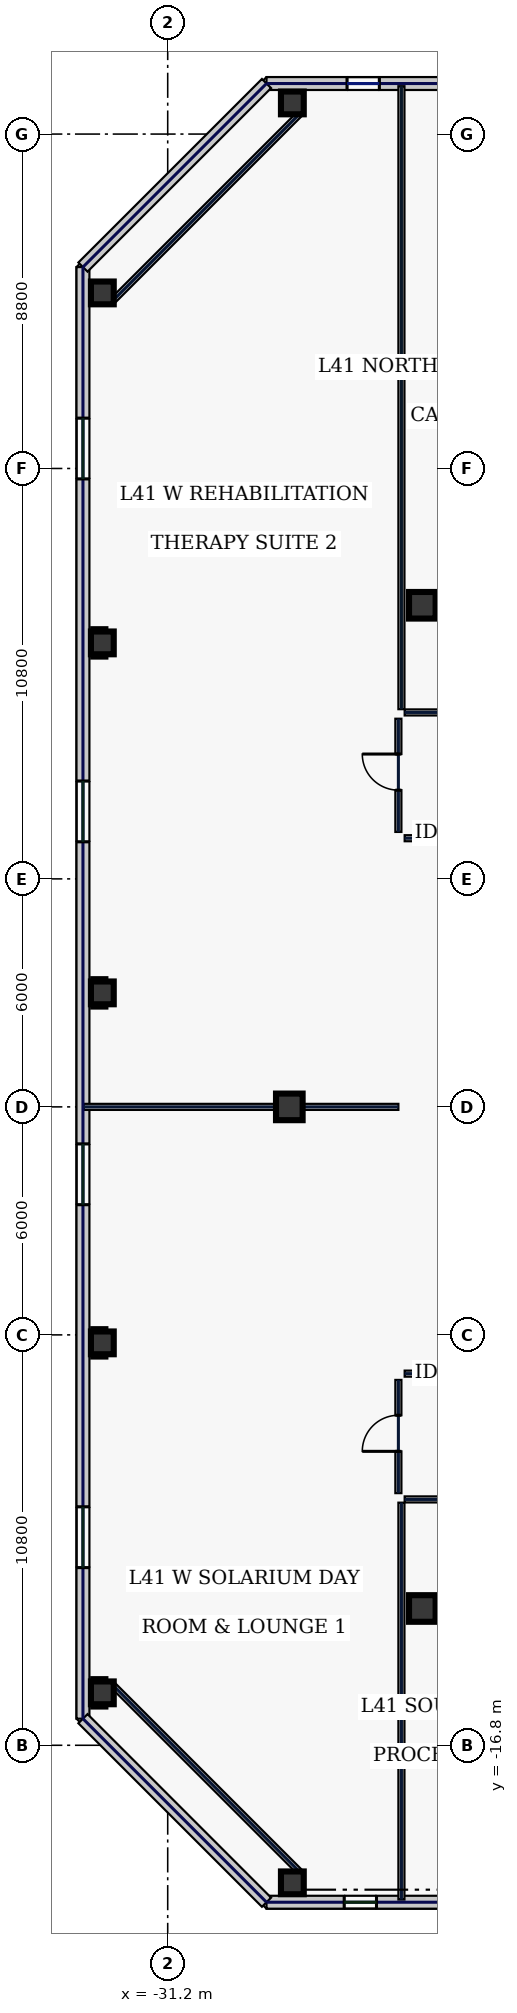
"""IFC4 building model, lengths in metres.
Left out: names, types, materials, properties, quantities, classifications, styles, units other than length and angle.
Written with IfcOpenShell. Run it as: python <this file> out.ifc"""

import sys

from ifc_helpers import new_model, si_unit, direction, frame, frame_2d, origin, origin_2d, place, context, subcontext, project, spatial, rectangle, hollow_rectangle, extrude, element, fill, save


model = new_model("IFC4")
c1 = context("Model", 3, precision=1e-05, world=origin(), true_north=direction((0.0, 1.0)))
c2 = subcontext(c1, "Body", "Model", "MODEL_VIEW")
j1 = project(units=[si_unit("LENGTHUNIT", "METRE"), si_unit("PLANEANGLEUNIT", "RADIAN")], contexts=[c1])
p1 = place(None, origin())
s1 = spatial("IfcSite", under=j1, at=p1, CompositionType="ELEMENT")
p2 = place(p1, origin())
s2 = spatial("IfcBuilding", under=s1, at=p2, CompositionType="ELEMENT")
p3 = place(p2, frame((0.0, 0.0, 180.2)))
s3 = spatial("IfcBuildingStorey", under=s2, at=p3, CompositionType="ELEMENT", Elevation=180.2)
for number, where, z_axis, x_axis in (
    (1, (-24.5, -13.2, 0.0), (0.0, 0.0, 1.0), (1.0, 0.0, 0.0)),
    (2, (-24.5, 13.2, 0.0), (0.0, 0.0, 1.0), (1.0, 0.0, 0.0)),
    (3, (-28.0, 0.0, 0.0), (0.0, 0.0, 1.0), (1.0, 0.0, 0.0)),
):
    element("IfcColumn", number, at=place(p3, frame(where, z_axis=z_axis, x_axis=x_axis)), inside=s3, PredefinedType="COLUMN", context=c2, shape_type="SweptSolid", body=[
        extrude(hollow_rectangle(XDim=0.7, YDim=0.7, WallThickness=0.032, at=origin_2d()), origin(), (0.0, 0.0, 1.0), 3.74),
    ])
for number, where, z_axis, x_axis in (
    (4, (-27.92, -20.42, 0.0), (0.0, 0.0, 1.0), (1.0, 0.0, 0.0)),
    (5, (-27.92, 26.42, 0.0), (0.0, 0.0, 1.0), (1.0, 0.0, 0.0)),
    (6, (-32.92, 21.42, 0.0), (0.0, 0.0, 1.0), (1.0, 0.0, 0.0)),
    (7, (-32.92, 12.21, 0.0), (0.0, 0.0, 1.0), (1.0, 0.0, 0.0)),
    (8, (-32.92, 3.0, 0.0), (0.0, 0.0, 1.0), (1.0, 0.0, 0.0)),
    (9, (-32.92, -6.21, 0.0), (0.0, 0.0, 1.0), (1.0, 0.0, 0.0)),
    (10, (-32.92, -15.42, 0.0), (0.0, 0.0, 1.0), (1.0, 0.0, 0.0)),
):
    element("IfcColumn", number, at=place(p3, frame(where, z_axis=z_axis, x_axis=x_axis)), inside=s3, PredefinedType="COLUMN", context=c2, shape_type="SweptSolid", body=[
        extrude(hollow_rectangle(XDim=0.6, YDim=0.6, WallThickness=0.028, at=origin_2d()), origin(), (0.0, 0.0, 1.0), 3.74),
    ])
p4 = place(p3, frame((-28.6, -20.93, 0.0), z_axis=(0.0, 0.0, 1.0), x_axis=(1.0, 0.0, 0.0)))
e11 = element("IfcWall", 11, at=p4, inside=s3, PredefinedType="STANDARD", context=c2, shape_type="SweptSolid", body=[
    extrude(rectangle(XDim=19.937, YDim=0.34, at=frame_2d((9.969, 0.0))), origin(), (0.0, 0.0, 1.0), 3.74),
])
p5 = place(p4, frame((2.044, 0.0, 0.8)))
e12 = element("IfcOpeningElement", 12, at=p5, cuts=e11, PredefinedType="OPENING", context=c2, shape_type="SweptSolid", body=[
    extrude(rectangle(XDim=0.85, YDim=1.85, at=frame_2d((0.425, 0.925))), frame((0.0, 0.18, 0.0), z_axis=(0.0, -1.0, 0.0), x_axis=(1.0, 0.0, 0.0)), (0.0, 0.0, 1.0), 0.36),
])
p6 = place(p4, frame((6.029, 0.0, 0.8)))
e13 = element("IfcOpeningElement", 13, at=p6, cuts=e11, PredefinedType="OPENING", context=c2, shape_type="SweptSolid", body=[
    extrude(rectangle(XDim=0.85, YDim=1.85, at=frame_2d((0.425, 0.925))), frame((0.0, 0.18, 0.0), z_axis=(0.0, -1.0, 0.0), x_axis=(1.0, 0.0, 0.0)), (0.0, 0.0, 1.0), 0.36),
])
p7 = place(p4, frame((10.707, 0.0, 0.8)))
e14 = element("IfcOpeningElement", 14, at=p7, cuts=e11, PredefinedType="OPENING", context=c2, shape_type="SweptSolid", body=[
    extrude(rectangle(XDim=1.95, YDim=2.1, at=frame_2d((0.975, 1.05))), frame((0.0, 0.18, 0.0), z_axis=(0.0, -1.0, 0.0), x_axis=(1.0, 0.0, 0.0)), (0.0, 0.0, 1.0), 0.36),
])
p8 = place(p4, frame((14.692, 0.0, 0.8)))
e15 = element("IfcOpeningElement", 15, at=p8, cuts=e11, PredefinedType="OPENING", context=c2, shape_type="SweptSolid", body=[
    extrude(rectangle(XDim=1.95, YDim=2.1, at=frame_2d((0.975, 1.05))), frame((0.0, 0.18, 0.0), z_axis=(0.0, -1.0, 0.0), x_axis=(1.0, 0.0, 0.0)), (0.0, 0.0, 1.0), 0.36),
])
p9 = place(p3, frame((-8.663, 26.93, 0.0), z_axis=(0.0, 0.0, 1.0), x_axis=(-1.0, 0.0, 0.0)))
e16 = element("IfcWall", 16, at=p9, inside=s3, PredefinedType="STANDARD", context=c2, shape_type="SweptSolid", body=[
    extrude(rectangle(XDim=19.937, YDim=0.34, at=frame_2d((9.969, 0.0))), origin(), (0.0, 0.0, 1.0), 3.74),
])
p10 = place(p9, frame((16.968, 0.0, 0.7)))
e17 = element("IfcOpeningElement", 17, at=p10, cuts=e16, PredefinedType="OPENING", context=c2, shape_type="SweptSolid", body=[
    extrude(rectangle(XDim=0.85, YDim=1.85, at=frame_2d((0.425, 0.925))), frame((0.0, 0.18, 0.0), z_axis=(0.0, -1.0, 0.0), x_axis=(1.0, 0.0, 0.0)), (0.0, 0.0, 1.0), 0.36),
])
p11 = place(p9, frame((12.983, 0.0, 0.7)))
e18 = element("IfcOpeningElement", 18, at=p11, cuts=e16, PredefinedType="OPENING", context=c2, shape_type="SweptSolid", body=[
    extrude(rectangle(XDim=0.85, YDim=1.85, at=frame_2d((0.425, 0.925))), frame((0.0, 0.18, 0.0), z_axis=(0.0, -1.0, 0.0), x_axis=(1.0, 0.0, 0.0)), (0.0, 0.0, 1.0), 0.36),
])
p12 = place(p9, frame((7.355, 0.0, 0.7)))
e19 = element("IfcOpeningElement", 19, at=p12, cuts=e16, PredefinedType="OPENING", context=c2, shape_type="SweptSolid", body=[
    extrude(rectangle(XDim=1.8, YDim=2.2, at=frame_2d((0.9, 1.1))), frame((0.0, 0.18, 0.0), z_axis=(0.0, -1.0, 0.0), x_axis=(1.0, 0.0, 0.0)), (0.0, 0.0, 1.0), 0.36),
])
p13 = place(p9, frame((3.371, 0.0, 0.7)))
e20 = element("IfcOpeningElement", 20, at=p13, cuts=e16, PredefinedType="OPENING", context=c2, shape_type="SweptSolid", body=[
    extrude(rectangle(XDim=0.85, YDim=1.85, at=frame_2d((0.425, 0.925))), frame((0.0, 0.18, 0.0), z_axis=(0.0, -1.0, 0.0), x_axis=(1.0, 0.0, 0.0)), (0.0, 0.0, 1.0), 0.36),
])
p14 = place(p3, frame((-33.43, 22.1, 0.0), z_axis=(0.0, 0.0, 1.0), x_axis=(0.0, -1.0, 0.0)))
e21 = element("IfcWall", 21, at=p14, inside=s3, PredefinedType="STANDARD", context=c2, shape_type="SweptSolid", body=[
    extrude(rectangle(XDim=38.2, YDim=0.34, at=frame_2d((19.1, 0.0))), origin(), (0.0, 0.0, 1.0), 3.74),
])
p15 = place(p14, frame((3.975, 0.0, 0.58)))
e22 = element("IfcOpeningElement", 22, at=p15, cuts=e21, PredefinedType="OPENING", context=c2, shape_type="SweptSolid", body=[
    extrude(rectangle(XDim=1.6, YDim=2.3, at=frame_2d((0.8, 1.15))), frame((0.0, 0.18, 0.0), z_axis=(0.0, -1.0, 0.0), x_axis=(1.0, 0.0, 0.0)), (0.0, 0.0, 1.0), 0.36),
])
p16 = place(p14, frame((13.525, 0.0, 0.58)))
e23 = element("IfcOpeningElement", 23, at=p16, cuts=e21, PredefinedType="OPENING", context=c2, shape_type="SweptSolid", body=[
    extrude(rectangle(XDim=1.6, YDim=2.3, at=frame_2d((0.8, 1.15))), frame((0.0, 0.18, 0.0), z_axis=(0.0, -1.0, 0.0), x_axis=(1.0, 0.0, 0.0)), (0.0, 0.0, 1.0), 0.36),
])
p17 = place(p14, frame((23.075, 0.0, 0.58)))
e24 = element("IfcOpeningElement", 24, at=p17, cuts=e21, PredefinedType="OPENING", context=c2, shape_type="SweptSolid", body=[
    extrude(rectangle(XDim=1.6, YDim=2.3, at=frame_2d((0.8, 1.15))), frame((0.0, 0.18, 0.0), z_axis=(0.0, -1.0, 0.0), x_axis=(1.0, 0.0, 0.0)), (0.0, 0.0, 1.0), 0.36),
])
p18 = place(p14, frame((32.625, 0.0, 0.58)))
e25 = element("IfcOpeningElement", 25, at=p18, cuts=e21, PredefinedType="OPENING", context=c2, shape_type="SweptSolid", body=[
    extrude(rectangle(XDim=1.6, YDim=2.3, at=frame_2d((0.8, 1.15))), frame((0.0, 0.18, 0.0), z_axis=(0.0, -1.0, 0.0), x_axis=(1.0, 0.0, 0.0)), (0.0, 0.0, 1.0), 0.36),
])
for number, where, z_axis, x_axis in (
    (26, (-28.6, 26.93, 0.0), (0.0, 0.0, 1.0), (-0.707, -0.707, 0.0)),
    (27, (-33.43, -16.1, 0.0), (0.0, 0.0, 1.0), (0.707, -0.707, 0.0)),
):
    element("IfcWall", number, at=place(p3, frame(where, z_axis=z_axis, x_axis=x_axis)), inside=s3, PredefinedType="STANDARD", context=c2, shape_type="SweptSolid", body=[
        extrude(rectangle(XDim=6.83, YDim=0.34, at=frame_2d((3.415, 0.0))), origin(), (0.0, 0.0, 1.0), 3.74),
    ])
for number, where, z_axis, x_axis in (
    (28, (-27.68, 26.18, 0.0), (0.0, 0.0, 1.0), (-0.707, -0.707, 0.0)),
    (29, (-32.68, -15.18, 0.0), (0.0, 0.0, 1.0), (0.707, -0.707, 0.0)),
):
    element("IfcWall", number, at=place(p3, frame(where, z_axis=z_axis, x_axis=x_axis)), inside=s3, PredefinedType="PARTITIONING", context=c2, shape_type="SweptSolid", body=[
        extrude(rectangle(XDim=7.071, YDim=0.16, at=frame_2d((3.536, 0.0))), origin(), (0.0, 0.0, 1.0), 3.74),
    ])
p19 = place(p3, frame((-25.13, -10.165, 0.0), z_axis=(0.0, 0.0, 1.0), x_axis=(0.0, 1.0, 0.0)))
e30 = element("IfcWall", 30, at=p19, inside=s3, PredefinedType="PARTITIONING", context=c2, shape_type="SweptSolid", body=[
    extrude(rectangle(XDim=2.98, YDim=0.16, at=frame_2d((1.49, 0.0))), origin(), (0.0, 0.0, 1.0), 3.74),
])
p20 = place(p19, frame((1.1, 0.0, 0.0)))
e31 = element("IfcOpeningElement", 31, at=p20, cuts=e30, PredefinedType="OPENING", context=c2, shape_type="SweptSolid", body=[
    extrude(rectangle(XDim=0.95, YDim=2.2, at=frame_2d((0.475, 1.1))), frame((0.0, 0.09, 0.0), z_axis=(0.0, -1.0, 0.0), x_axis=(1.0, 0.0, 0.0)), (0.0, 0.0, 1.0), 0.18),
])
for number, where, z_axis, x_axis in (
    (32, (-24.965, -7.02, 0.0), (0.0, 0.0, 1.0), (1.0, 0.0, 0.0)),
    (33, (-10.715, 7.07, 0.0), (0.0, 0.0, 1.0), (-1.0, 0.0, 0.0)),
):
    element("IfcWall", number, at=place(p3, frame(where, z_axis=z_axis, x_axis=x_axis)), inside=s3, PredefinedType="PARTITIONING", context=c2, shape_type="SweptSolid", body=[
        extrude(rectangle(XDim=14.25, YDim=0.16, at=frame_2d((7.125, 0.0))), origin(), (0.0, 0.0, 1.0), 3.74),
    ])
p21 = place(p3, frame((-25.13, 7.235, 0.0), z_axis=(0.0, 0.0, 1.0), x_axis=(0.0, 1.0, 0.0)))
e34 = element("IfcWall", 34, at=p21, inside=s3, PredefinedType="PARTITIONING", context=c2, shape_type="SweptSolid", body=[
    extrude(rectangle(XDim=2.98, YDim=0.16, at=frame_2d((1.49, 0.0))), origin(), (0.0, 0.0, 1.0), 3.74),
])
p22 = place(p21, frame((1.1, 0.0, 0.0)))
e35 = element("IfcOpeningElement", 35, at=p22, cuts=e34, PredefinedType="OPENING", context=c2, shape_type="SweptSolid", body=[
    extrude(rectangle(XDim=0.95, YDim=2.2, at=frame_2d((0.475, 1.1))), frame((0.0, 0.09, 0.0), z_axis=(0.0, -1.0, 0.0), x_axis=(1.0, 0.0, 0.0)), (0.0, 0.0, 1.0), 0.18),
])
p23 = place(p3, frame((-24.965, 10.38, 0.0), z_axis=(0.0, 0.0, 1.0), x_axis=(1.0, 0.0, 0.0)))
e36 = element("IfcWall", 36, at=p23, inside=s3, PredefinedType="PARTITIONING", context=c2, shape_type="SweptSolid", body=[
    extrude(rectangle(XDim=49.93, YDim=0.16, at=frame_2d((24.965, 0.0))), origin(), (0.0, 0.0, 1.0), 3.74),
])
p24 = place(p23, frame((2.044, 0.0, 0.0)))
e37 = element("IfcOpeningElement", 37, at=p24, cuts=e36, PredefinedType="OPENING", context=c2, shape_type="SweptSolid", body=[
    extrude(rectangle(XDim=1.15, YDim=2.2, at=frame_2d((0.575, 1.1))), frame((0.0, 0.09, 0.0), z_axis=(0.0, -1.0, 0.0), x_axis=(1.0, 0.0, 0.0)), (0.0, 0.0, 1.0), 0.18),
])
p25 = place(p23, frame((7.325, 0.0, 0.0)))
e38 = element("IfcOpeningElement", 38, at=p25, cuts=e36, PredefinedType="OPENING", context=c2, shape_type="SweptSolid", body=[
    extrude(rectangle(XDim=1.3, YDim=2.2, at=frame_2d((0.65, 1.1))), frame((0.0, 0.09, 0.0), z_axis=(0.0, -1.0, 0.0), x_axis=(1.0, 0.0, 0.0)), (0.0, 0.0, 1.0), 0.18),
])
p26 = place(p23, frame((13.525, 0.0, 0.0)))
e39 = element("IfcOpeningElement", 39, at=p26, cuts=e36, PredefinedType="OPENING", context=c2, shape_type="SweptSolid", body=[
    extrude(rectangle(XDim=1.3, YDim=2.2, at=frame_2d((0.65, 1.1))), frame((0.0, 0.09, 0.0), z_axis=(0.0, -1.0, 0.0), x_axis=(1.0, 0.0, 0.0)), (0.0, 0.0, 1.0), 0.18),
])
p27 = place(p23, frame((20.65, 0.0, 0.0)))
e40 = element("IfcOpeningElement", 40, at=p27, cuts=e36, PredefinedType="OPENING", context=c2, shape_type="SweptSolid", body=[
    extrude(rectangle(XDim=0.95, YDim=2.2, at=frame_2d((0.475, 1.1))), frame((0.0, 0.09, 0.0), z_axis=(0.0, -1.0, 0.0), x_axis=(1.0, 0.0, 0.0)), (0.0, 0.0, 1.0), 0.18),
])
p28 = place(p23, frame((28.175, 0.0, 0.0)))
e41 = element("IfcOpeningElement", 41, at=p28, cuts=e36, PredefinedType="OPENING", context=c2, shape_type="SweptSolid", body=[
    extrude(rectangle(XDim=1.45, YDim=2.2, at=frame_2d((0.725, 1.1))), frame((0.0, 0.09, 0.0), z_axis=(0.0, -1.0, 0.0), x_axis=(1.0, 0.0, 0.0)), (0.0, 0.0, 1.0), 0.18),
])
p29 = place(p23, frame((37.43, 0.0, 0.0)))
e42 = element("IfcOpeningElement", 42, at=p29, cuts=e36, PredefinedType="OPENING", context=c2, shape_type="SweptSolid", body=[
    extrude(rectangle(XDim=0.95, YDim=2.2, at=frame_2d((0.475, 1.1))), frame((0.0, 0.09, 0.0), z_axis=(0.0, -1.0, 0.0), x_axis=(1.0, 0.0, 0.0)), (0.0, 0.0, 1.0), 0.18),
])
p30 = place(p23, frame((42.37, 0.0, 0.0)))
e43 = element("IfcOpeningElement", 43, at=p30, cuts=e36, PredefinedType="OPENING", context=c2, shape_type="SweptSolid", body=[
    extrude(rectangle(XDim=0.95, YDim=2.2, at=frame_2d((0.475, 1.1))), frame((0.0, 0.09, 0.0), z_axis=(0.0, -1.0, 0.0), x_axis=(1.0, 0.0, 0.0)), (0.0, 0.0, 1.0), 0.18),
])
p31 = place(p23, frame((47.106, 0.0, 0.0)))
e44 = element("IfcOpeningElement", 44, at=p31, cuts=e36, PredefinedType="OPENING", context=c2, shape_type="SweptSolid", body=[
    extrude(rectangle(XDim=1.15, YDim=2.2, at=frame_2d((0.575, 1.1))), frame((0.0, 0.09, 0.0), z_axis=(0.0, -1.0, 0.0), x_axis=(1.0, 0.0, 0.0)), (0.0, 0.0, 1.0), 0.18),
])
p32 = place(p3, frame((24.965, -10.33, 0.0), z_axis=(0.0, 0.0, 1.0), x_axis=(-1.0, 0.0, 0.0)))
e45 = element("IfcWall", 45, at=p32, inside=s3, PredefinedType="PARTITIONING", context=c2, shape_type="SweptSolid", body=[
    extrude(rectangle(XDim=49.93, YDim=0.16, at=frame_2d((24.965, 0.0))), origin(), (0.0, 0.0, 1.0), 3.74),
])
p33 = place(p32, frame((47.106, 0.0, 0.0)))
e46 = element("IfcOpeningElement", 46, at=p33, cuts=e45, PredefinedType="OPENING", context=c2, shape_type="SweptSolid", body=[
    extrude(rectangle(XDim=0.95, YDim=2.2, at=frame_2d((0.475, 1.1))), frame((0.0, 0.09, 0.0), z_axis=(0.0, -1.0, 0.0), x_axis=(1.0, 0.0, 0.0)), (0.0, 0.0, 1.0), 0.18),
])
p34 = place(p32, frame((40.075, 0.0, 0.0)))
e47 = element("IfcOpeningElement", 47, at=p34, cuts=e45, PredefinedType="OPENING", context=c2, shape_type="SweptSolid", body=[
    extrude(rectangle(XDim=1.05, YDim=2.2, at=frame_2d((0.525, 1.1))), frame((0.0, 0.09, 0.0), z_axis=(0.0, -1.0, 0.0), x_axis=(1.0, 0.0, 0.0)), (0.0, 0.0, 1.0), 0.18),
])
p35 = place(p32, frame((30.3, 0.0, 0.0)))
e48 = element("IfcOpeningElement", 48, at=p35, cuts=e45, PredefinedType="OPENING", context=c2, shape_type="SweptSolid", body=[
    extrude(rectangle(XDim=0.95, YDim=2.2, at=frame_2d((0.475, 1.1))), frame((0.0, 0.09, 0.0), z_axis=(0.0, -1.0, 0.0), x_axis=(1.0, 0.0, 0.0)), (0.0, 0.0, 1.0), 0.18),
])
p36 = place(p32, frame((20.375, 0.0, 0.0)))
e49 = element("IfcOpeningElement", 49, at=p36, cuts=e45, PredefinedType="OPENING", context=c2, shape_type="SweptSolid", body=[
    extrude(rectangle(XDim=1.3, YDim=2.2, at=frame_2d((0.65, 1.1))), frame((0.0, 0.09, 0.0), z_axis=(0.0, -1.0, 0.0), x_axis=(1.0, 0.0, 0.0)), (0.0, 0.0, 1.0), 0.18),
])
p37 = place(p32, frame((11.025, 0.0, 0.0)))
e50 = element("IfcOpeningElement", 50, at=p37, cuts=e45, PredefinedType="OPENING", context=c2, shape_type="SweptSolid", body=[
    extrude(rectangle(XDim=0.95, YDim=2.2, at=frame_2d((0.475, 1.1))), frame((0.0, 0.09, 0.0), z_axis=(0.0, -1.0, 0.0), x_axis=(1.0, 0.0, 0.0)), (0.0, 0.0, 1.0), 0.18),
])
p38 = place(p32, frame((3.144, 0.0, 0.0)))
e51 = element("IfcOpeningElement", 51, at=p38, cuts=e45, PredefinedType="OPENING", context=c2, shape_type="SweptSolid", body=[
    extrude(rectangle(XDim=0.95, YDim=2.2, at=frame_2d((0.475, 1.1))), frame((0.0, 0.09, 0.0), z_axis=(0.0, -1.0, 0.0), x_axis=(1.0, 0.0, 0.0)), (0.0, 0.0, 1.0), 0.18),
])
p39 = place(p3, frame((-25.05, 10.465, 0.0), z_axis=(0.0, 0.0, 1.0), x_axis=(0.0, 1.0, 0.0)))
e52 = element("IfcWall", 52, at=p39, inside=s3, PredefinedType="PARTITIONING", context=c2, shape_type="SweptSolid", body=[
    extrude(rectangle(XDim=16.395, YDim=0.16, at=frame_2d((8.198, 0.0))), origin(), (0.0, 0.0, 1.0), 3.285),
])
p40 = place(p3, frame((-25.05, -20.86, 0.0), z_axis=(0.0, 0.0, 1.0), x_axis=(0.0, 1.0, 0.0)))
e53 = element("IfcWall", 53, at=p40, inside=s3, PredefinedType="PARTITIONING", context=c2, shape_type="SweptSolid", body=[
    extrude(rectangle(XDim=10.445, YDim=0.16, at=frame_2d((5.223, 0.0))), origin(), (0.0, 0.0, 1.0), 3.74),
])
p41 = place(p3, frame((-33.41, 0.0, 0.0), z_axis=(0.0, 0.0, 1.0), x_axis=(1.0, 0.0, 0.0)))
e54 = element("IfcWall", 54, at=p41, inside=s3, PredefinedType="PARTITIONING", context=c2, shape_type="SweptSolid", body=[
    extrude(rectangle(XDim=8.28, YDim=0.16, at=frame_2d((4.14, 0.0))), origin(), (0.0, 0.0, 1.0), 3.74),
])
p42 = place(p5, origin())
e55 = element("IfcWindow", 55, at=p42, inside=s3, PartitioningType="SINGLE_PANEL", PredefinedType="WINDOW", context=c2, shape_type="SweptSolid", body=[
    extrude(rectangle(XDim=0.85, YDim=1.85, at=frame_2d((0.425, 0.925))), frame((0.0, 0.03, 0.0), z_axis=(0.0, -1.0, 0.0), x_axis=(1.0, 0.0, 0.0)), (0.0, 0.0, 1.0), 0.06),
])
fill(e12, e55)
p43 = place(p10, origin())
e56 = element("IfcWindow", 56, at=p43, inside=s3, PartitioningType="SINGLE_PANEL", PredefinedType="WINDOW", context=c2, shape_type="SweptSolid", body=[
    extrude(rectangle(XDim=0.85, YDim=1.85, at=frame_2d((0.425, 0.925))), frame((0.0, 0.03, 0.0), z_axis=(0.0, -1.0, 0.0), x_axis=(1.0, 0.0, 0.0)), (0.0, 0.0, 1.0), 0.06),
])
fill(e17, e56)
p44 = place(p15, origin())
e57 = element("IfcWindow", 57, at=p44, inside=s3, PartitioningType="SINGLE_PANEL", PredefinedType="WINDOW", context=c2, shape_type="SweptSolid", body=[
    extrude(rectangle(XDim=1.6, YDim=2.3, at=frame_2d((0.8, 1.15))), frame((0.0, 0.03, 0.0), z_axis=(0.0, -1.0, 0.0), x_axis=(1.0, 0.0, 0.0)), (0.0, 0.0, 1.0), 0.06),
])
fill(e22, e57)
p45 = place(p16, origin())
e58 = element("IfcWindow", 58, at=p45, inside=s3, PartitioningType="SINGLE_PANEL", PredefinedType="WINDOW", context=c2, shape_type="SweptSolid", body=[
    extrude(rectangle(XDim=1.6, YDim=2.3, at=frame_2d((0.8, 1.15))), frame((0.0, 0.03, 0.0), z_axis=(0.0, -1.0, 0.0), x_axis=(1.0, 0.0, 0.0)), (0.0, 0.0, 1.0), 0.06),
])
fill(e23, e58)
p46 = place(p17, origin())
e59 = element("IfcWindow", 59, at=p46, inside=s3, PartitioningType="SINGLE_PANEL", PredefinedType="WINDOW", context=c2, shape_type="SweptSolid", body=[
    extrude(rectangle(XDim=1.6, YDim=2.3, at=frame_2d((0.8, 1.15))), frame((0.0, 0.03, 0.0), z_axis=(0.0, -1.0, 0.0), x_axis=(1.0, 0.0, 0.0)), (0.0, 0.0, 1.0), 0.06),
])
fill(e24, e59)
p47 = place(p18, origin())
e60 = element("IfcWindow", 60, at=p47, inside=s3, PartitioningType="SINGLE_PANEL", PredefinedType="WINDOW", context=c2, shape_type="SweptSolid", body=[
    extrude(rectangle(XDim=1.6, YDim=2.3, at=frame_2d((0.8, 1.15))), frame((0.0, 0.03, 0.0), z_axis=(0.0, -1.0, 0.0), x_axis=(1.0, 0.0, 0.0)), (0.0, 0.0, 1.0), 0.06),
])
fill(e25, e60)
p48 = place(p20, origin())
e61 = element("IfcDoor", 61, at=p48, inside=s3, OperationType="SINGLE_SWING_LEFT", PredefinedType="DOOR", context=c2, shape_type="SweptSolid", body=[
    extrude(rectangle(XDim=0.95, YDim=2.2, at=frame_2d((0.475, 1.1))), frame((0.0, 0.025, 0.0), z_axis=(0.0, -1.0, 0.0), x_axis=(1.0, 0.0, 0.0)), (0.0, 0.0, 1.0), 0.05),
])
fill(e31, e61)
p49 = place(p22, origin())
e62 = element("IfcDoor", 62, at=p49, inside=s3, OperationType="SINGLE_SWING_RIGHT", PredefinedType="DOOR", context=c2, shape_type="SweptSolid", body=[
    extrude(rectangle(XDim=0.95, YDim=2.2, at=frame_2d((0.475, 1.1))), frame((0.0, 0.025, 0.0), z_axis=(0.0, -1.0, 0.0), x_axis=(1.0, 0.0, 0.0)), (0.0, 0.0, 1.0), 0.05),
])
fill(e35, e62)
save(model, sys.argv[1])
